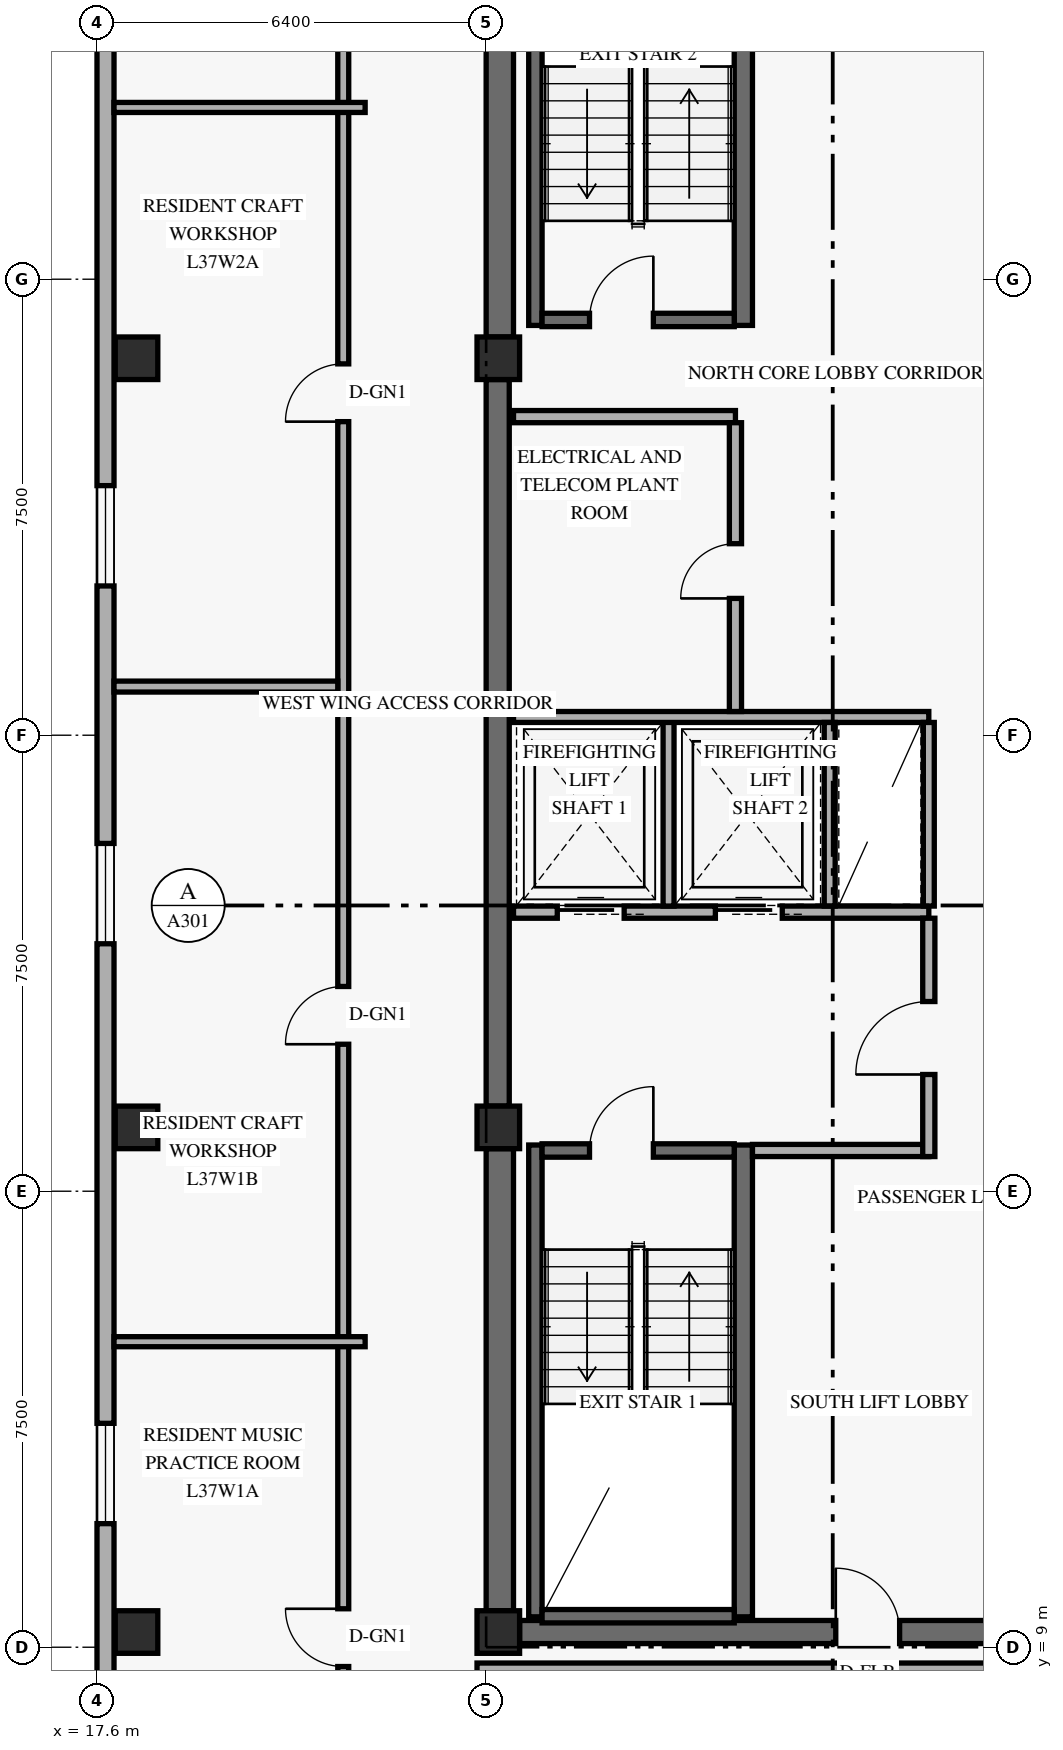
"""IFC4 building model, lengths in metres.
Left out: names, types, materials, properties, quantities, classifications, styles, units other than length and angle.
Written with IfcOpenShell. Run it as: python <this file> out.ifc"""

import sys

from ifc_helpers import new_model, si_unit, direction, frame, frame_2d, origin, origin_2d, place, context, subcontext, project, spatial, rectangle, extrude, element, fill, save


model = new_model("IFC4")
c1 = context("Model", 3, precision=1e-05, world=origin(), true_north=direction((0.0, 1.0)))
c2 = subcontext(c1, "Body", "Model", "MODEL_VIEW")
j1 = project(units=[si_unit("LENGTHUNIT", "METRE"), si_unit("PLANEANGLEUNIT", "RADIAN")], contexts=[c1])
p1 = place(None, origin())
s1 = spatial("IfcSite", under=j1, at=p1, CompositionType="ELEMENT")
p2 = place(p1, origin())
s2 = spatial("IfcBuilding", under=s1, at=p2, CompositionType="ELEMENT")
p3 = place(p2, frame((0.0, 0.0, 144.6)))
s3 = spatial("IfcBuildingStorey", under=s2, at=p3, CompositionType="ELEMENT", Elevation=144.6)
p4 = place(p3, frame((24.225, 9.6, 0.0), z_axis=(0.0, 0.0, 1.0), x_axis=(0.0, 1.0, 0.0)))
e1 = element("IfcWall", 1, at=p4, inside=s3, PredefinedType="SHEAR", context=c2, shape_type="SweptSolid", body=[
    extrude(rectangle(XDim=7.6, YDim=0.45, at=frame_2d((3.8, 0.0))), origin(), (0.0, 0.0, 1.0), 2.748),
])
p5 = place(p3, frame((24.19, 17.9, 0.0), z_axis=(0.0, 0.0, 1.0), x_axis=(0.0, 1.0, 0.0)))
e2 = element("IfcWall", 2, at=p5, inside=s3, PredefinedType="SHEAR", context=c2, shape_type="SweptSolid", body=[
    extrude(rectangle(XDim=11.95, YDim=0.38, at=frame_2d((5.975, 0.0))), origin(), (0.0, 0.0, 1.0), 2.748),
])
p6 = place(p3, frame((24.225, 30.55, 0.0), z_axis=(0.0, 0.0, 1.0), x_axis=(0.0, 1.0, 0.0)))
e3 = element("IfcWall", 3, at=p6, inside=s3, PredefinedType="SHEAR", context=c2, shape_type="SweptSolid", body=[
    extrude(rectangle(XDim=7.85, YDim=0.45, at=frame_2d((3.925, 0.0))), origin(), (0.0, 0.0, 1.0), 2.748),
])
p7 = place(p3, frame((24.55, 9.25, 0.0), z_axis=(0.0, 0.0, 1.0), x_axis=(1.0, 0.0, 0.0)))
e4 = element("IfcWall", 4, at=p7, inside=s3, PredefinedType="SHEAR", context=c2, shape_type="SweptSolid", body=[
    extrude(rectangle(XDim=10.3, YDim=0.38, at=frame_2d((5.15, 0.0))), origin(), (0.0, 0.0, 1.0), 3.36),
])
p8 = place(p7, frame((5.2, 0.0, 0.0)))
e5 = element("IfcOpeningElement", 5, at=p8, cuts=e4, PredefinedType="OPENING", context=c2, shape_type="SweptSolid", body=[
    extrude(rectangle(XDim=1.05, YDim=2.15, at=frame_2d((0.525, 1.075))), frame((0.0, 0.2, 0.0), z_axis=(0.0, -1.0, 0.0), x_axis=(1.0, 0.0, 0.0)), (0.0, 0.0, 1.0), 0.4),
])
p9 = place(p3, frame((24.81, 9.5, 0.0), z_axis=(0.0, 0.0, 1.0), x_axis=(0.0, 1.0, 0.0)))
e6 = element("IfcWall", 6, at=p9, inside=s3, PredefinedType="SHEAR", context=c2, shape_type="SweptSolid", body=[
    extrude(rectangle(XDim=7.76, YDim=0.22, at=frame_2d((3.88, 0.0))), origin(), (0.0, 0.0, 1.0), 3.36),
])
p10 = place(p3, frame((28.23, 9.5, 0.0), z_axis=(0.0, 0.0, 1.0), x_axis=(0.0, 1.0, 0.0)))
e7 = element("IfcWall", 7, at=p10, inside=s3, PredefinedType="SHEAR", context=c2, shape_type="SweptSolid", body=[
    extrude(rectangle(XDim=7.76, YDim=0.3, at=frame_2d((3.88, 0.0))), origin(), (0.0, 0.0, 1.0), 3.36),
])
p11 = place(p3, frame((24.92, 9.51, 0.0), z_axis=(0.0, 0.0, 1.0), x_axis=(1.0, 0.0, 0.0)))
e8 = element("IfcWall", 8, at=p11, inside=s3, PredefinedType="SHEAR", context=c2, shape_type="SweptSolid", body=[
    extrude(rectangle(XDim=3.16, YDim=0.22, at=frame_2d((1.58, 0.0))), origin(), (0.0, 0.0, 1.0), 3.36),
])
p12 = place(p3, frame((24.92, 17.17, 0.0), z_axis=(0.0, 0.0, 1.0), x_axis=(1.0, 0.0, 0.0)))
e9 = element("IfcWall", 9, at=p12, inside=s3, PredefinedType="SHEAR", context=c2, shape_type="SweptSolid", body=[
    extrude(rectangle(XDim=3.16, YDim=0.22, at=frame_2d((1.58, 0.0))), origin(), (0.0, 0.0, 1.0), 3.36),
])
p13 = place(p12, frame((0.78, 0.0, 0.0)))
e10 = element("IfcOpeningElement", 10, at=p13, cuts=e9, PredefinedType="OPENING", context=c2, shape_type="SweptSolid", body=[
    extrude(rectangle(XDim=1.05, YDim=2.15, at=frame_2d((0.525, 1.075))), frame((0.0, 0.12, 0.0), z_axis=(0.0, -1.0, 0.0), x_axis=(1.0, 0.0, 0.0)), (0.0, 0.0, 1.0), 0.24),
])
p14 = place(p3, frame((24.81, 30.74, 0.0), z_axis=(0.0, 0.0, 1.0), x_axis=(0.0, 1.0, 0.0)))
e11 = element("IfcWall", 11, at=p14, inside=s3, PredefinedType="SHEAR", context=c2, shape_type="SweptSolid", body=[
    extrude(rectangle(XDim=7.76, YDim=0.22, at=frame_2d((3.88, 0.0))), origin(), (0.0, 0.0, 1.0), 3.36),
])
p15 = place(p3, frame((28.23, 30.74, 0.0), z_axis=(0.0, 0.0, 1.0), x_axis=(0.0, 1.0, 0.0)))
e12 = element("IfcWall", 12, at=p15, inside=s3, PredefinedType="SHEAR", context=c2, shape_type="SweptSolid", body=[
    extrude(rectangle(XDim=7.76, YDim=0.3, at=frame_2d((3.88, 0.0))), origin(), (0.0, 0.0, 1.0), 3.36),
])
p16 = place(p3, frame((24.92, 30.83, 0.0), z_axis=(0.0, 0.0, 1.0), x_axis=(1.0, 0.0, 0.0)))
e13 = element("IfcWall", 13, at=p16, inside=s3, PredefinedType="SHEAR", context=c2, shape_type="SweptSolid", body=[
    extrude(rectangle(XDim=3.16, YDim=0.22, at=frame_2d((1.58, 0.0))), origin(), (0.0, 0.0, 1.0), 3.36),
])
p17 = place(p16, frame((0.78, 0.0, 0.0)))
e14 = element("IfcOpeningElement", 14, at=p17, cuts=e13, PredefinedType="OPENING", context=c2, shape_type="SweptSolid", body=[
    extrude(rectangle(XDim=1.05, YDim=2.15, at=frame_2d((0.525, 1.075))), frame((0.0, 0.12, 0.0), z_axis=(0.0, -1.0, 0.0), x_axis=(1.0, 0.0, 0.0)), (0.0, 0.0, 1.0), 0.24),
])
for number, where, z_axis, x_axis in (
    (15, (18.25, 9.25, 0.0), (0.0, 0.0, 1.0), (1.0, 0.0, 0.0)),
    (16, (18.25, 17.55, 0.0), (0.0, 0.0, 1.0), (1.0, 0.0, 0.0)),
    (17, (18.25, 30.2, 0.0), (0.0, 0.0, 1.0), (1.0, 0.0, 0.0)),
    (18, (24.2, 9.25, 0.0), (0.0, 0.0, 1.0), (1.0, 0.0, 0.0)),
    (19, (24.2, 17.55, 0.0), (0.0, 0.0, 1.0), (1.0, 0.0, 0.0)),
    (20, (24.2, 30.2, 0.0), (0.0, 0.0, 1.0), (1.0, 0.0, 0.0)),
):
    element("IfcColumn", number, at=place(p3, frame(where, z_axis=z_axis, x_axis=x_axis)), inside=s3, PredefinedType="COLUMN", context=c2, shape_type="SweptSolid", body=[
        extrude(rectangle(XDim=0.7, YDim=0.7, at=origin_2d()), origin(), (0.0, 0.0, 1.0), 3.6),
    ])
p18 = place(p3, frame((17.74, 40.38, 0.0), z_axis=(0.0, 0.0, 1.0), x_axis=(0.0, -1.0, 0.0)))
e21 = element("IfcWall", 21, at=p18, inside=s3, PredefinedType="SOLIDWALL", context=c2, shape_type="SweptSolid", body=[
    extrude(rectangle(XDim=32.76, YDim=0.28, at=frame_2d((16.38, 0.0))), origin(), (0.0, 0.0, 1.0), 3.36),
])
p19 = place(p18, frame((27.698, 0.0, 0.85)))
e22 = element("IfcOpeningElement", 22, at=p19, cuts=e21, PredefinedType="OPENING", context=c2, shape_type="SweptSolid", body=[
    extrude(rectangle(XDim=1.65, YDim=1.6, at=frame_2d((0.825, 0.8))), frame((0.0, 0.15, 0.0), z_axis=(0.0, -1.0, 0.0), x_axis=(1.0, 0.0, 0.0)), (0.0, 0.0, 1.0), 0.3),
])
p20 = place(p18, frame((18.16, 0.0, 0.85)))
e23 = element("IfcOpeningElement", 23, at=p20, cuts=e21, PredefinedType="OPENING", context=c2, shape_type="SweptSolid", body=[
    extrude(rectangle(XDim=1.65, YDim=1.6, at=frame_2d((0.825, 0.8))), frame((0.0, 0.15, 0.0), z_axis=(0.0, -1.0, 0.0), x_axis=(1.0, 0.0, 0.0)), (0.0, 0.0, 1.0), 0.3),
])
p21 = place(p18, frame((12.275, 0.0, 0.85)))
e24 = element("IfcOpeningElement", 24, at=p21, cuts=e21, PredefinedType="OPENING", context=c2, shape_type="SweptSolid", body=[
    extrude(rectangle(XDim=1.65, YDim=1.6, at=frame_2d((0.825, 0.8))), frame((0.0, 0.15, 0.0), z_axis=(0.0, -1.0, 0.0), x_axis=(1.0, 0.0, 0.0)), (0.0, 0.0, 1.0), 0.3),
])
p22 = place(p18, frame((3.238, 0.0, 0.85)))
e25 = element("IfcOpeningElement", 25, at=p22, cuts=e21, PredefinedType="OPENING", context=c2, shape_type="SweptSolid", body=[
    extrude(rectangle(XDim=1.65, YDim=1.6, at=frame_2d((0.825, 0.8))), frame((0.0, 0.15, 0.0), z_axis=(0.0, -1.0, 0.0), x_axis=(1.0, 0.0, 0.0)), (0.0, 0.0, 1.0), 0.3),
])
p23 = place(p3, frame((24.45, 21.09, 0.0), z_axis=(0.0, 0.0, 1.0), x_axis=(1.0, 0.0, 0.0)))
e26 = element("IfcWall", 26, at=p23, inside=s3, PredefinedType="STANDARD", context=c2, shape_type="SweptSolid", body=[
    extrude(rectangle(XDim=6.83, YDim=0.2, at=frame_2d((3.415, 0.0))), origin(), (0.0, 0.0, 1.0), 3.36),
])
p24 = place(p23, frame((0.72, 0.0, 0.0)))
e27 = element("IfcOpeningElement", 27, at=p24, cuts=e26, PredefinedType="OPENING", context=c2, shape_type="SweptSolid", body=[
    extrude(rectangle(XDim=1.1, YDim=2.2, at=frame_2d((0.55, 1.1))), frame((0.0, 0.11, 0.0), z_axis=(0.0, -1.0, 0.0), x_axis=(1.0, 0.0, 0.0)), (0.0, 0.0, 1.0), 0.22),
])
p25 = place(p23, frame((3.32, 0.0, 0.0)))
e28 = element("IfcOpeningElement", 28, at=p25, cuts=e26, PredefinedType="OPENING", context=c2, shape_type="SweptSolid", body=[
    extrude(rectangle(XDim=1.1, YDim=2.2, at=frame_2d((0.55, 1.1))), frame((0.0, 0.11, 0.0), z_axis=(0.0, -1.0, 0.0), x_axis=(1.0, 0.0, 0.0)), (0.0, 0.0, 1.0), 0.22),
])
p26 = place(p3, frame((28.38, 17.17, 0.0), z_axis=(0.0, 0.0, 1.0), x_axis=(1.0, 0.0, 0.0)))
e29 = element("IfcWall", 29, at=p26, inside=s3, PredefinedType="STANDARD", context=c2, shape_type="SweptSolid", body=[
    extrude(rectangle(XDim=2.9, YDim=0.2, at=frame_2d((1.45, 0.0))), origin(), (0.0, 0.0, 1.0), 3.36),
])
p27 = place(p3, frame((31.28, 17.07, 0.0), z_axis=(0.0, 0.0, 1.0), x_axis=(0.0, 1.0, 0.0)))
e30 = element("IfcWall", 30, at=p27, inside=s3, PredefinedType="STANDARD", context=c2, shape_type="SweptSolid", body=[
    extrude(rectangle(XDim=3.92, YDim=0.2, at=frame_2d((1.96, 0.0))), origin(), (0.0, 0.0, 1.0), 2.73),
])
p28 = place(p27, frame((1.35, 0.0, 0.0)))
e31 = element("IfcOpeningElement", 31, at=p28, cuts=e30, PredefinedType="OPENING", context=c2, shape_type="SweptSolid", body=[
    extrude(rectangle(XDim=1.2, YDim=2.15, at=frame_2d((0.6, 1.075))), frame((0.0, 0.11, 0.0), z_axis=(0.0, -1.0, 0.0), x_axis=(1.0, 0.0, 0.0)), (0.0, 0.0, 1.0), 0.22),
])
p29 = place(p3, frame((27.0, 21.19, 0.0), z_axis=(0.0, 0.0, 1.0), x_axis=(0.0, 1.0, 0.0)))
e32 = element("IfcWall", 32, at=p29, inside=s3, PredefinedType="STANDARD", context=c2, shape_type="SweptSolid", body=[
    extrude(rectangle(XDim=3.11, YDim=0.18, at=frame_2d((1.555, 0.0))), origin(), (0.0, 0.0, 1.0), 3.36),
])
p30 = place(p3, frame((24.45, 24.3, 0.0), z_axis=(0.0, 0.0, 1.0), x_axis=(1.0, 0.0, 0.0)))
e33 = element("IfcWall", 33, at=p30, inside=s3, PredefinedType="STANDARD", context=c2, shape_type="SweptSolid", body=[
    extrude(rectangle(XDim=6.83, YDim=0.18, at=frame_2d((3.415, 0.0))), origin(), (0.0, 0.0, 1.0), 3.36),
])
for number, where, z_axis, x_axis in (
    (34, (29.65, 21.19, 0.0), (0.0, 0.0, 1.0), (0.0, 1.0, 0.0)),
    (35, (31.28, 21.19, 0.0), (0.0, 0.0, 1.0), (0.0, 1.0, 0.0)),
):
    element("IfcWall", number, at=place(p3, frame(where, z_axis=z_axis, x_axis=x_axis)), inside=s3, PredefinedType="STANDARD", context=c2, shape_type="SweptSolid", body=[
        extrude(rectangle(XDim=3.02, YDim=0.18, at=frame_2d((1.51, 0.0))), origin(), (0.0, 0.0, 1.0), 3.36),
    ])
p31 = place(p3, frame((24.45, 29.24, 0.0), z_axis=(0.0, 0.0, 1.0), x_axis=(1.0, 0.0, 0.0)))
e36 = element("IfcWall", 36, at=p31, inside=s3, PredefinedType="STANDARD", context=c2, shape_type="SweptSolid", body=[
    extrude(rectangle(XDim=3.65, YDim=0.2, at=frame_2d((1.825, 0.0))), origin(), (0.0, 0.0, 1.0), 3.36),
])
p32 = place(p3, frame((28.1, 24.39, 0.0), z_axis=(0.0, 0.0, 1.0), x_axis=(0.0, 1.0, 0.0)))
e37 = element("IfcWall", 37, at=p32, inside=s3, PredefinedType="STANDARD", context=c2, shape_type="SweptSolid", body=[
    extrude(rectangle(XDim=4.75, YDim=0.2, at=frame_2d((2.375, 0.0))), origin(), (0.0, 0.0, 1.0), 3.36),
])
p33 = place(p32, frame((1.86, 0.0, 0.0)))
e38 = element("IfcOpeningElement", 38, at=p33, cuts=e37, PredefinedType="OPENING", context=c2, shape_type="SweptSolid", body=[
    extrude(rectangle(XDim=0.9, YDim=2.1, at=frame_2d((0.45, 1.05))), frame((0.0, 0.11, 0.0), z_axis=(0.0, -1.0, 0.0), x_axis=(1.0, 0.0, 0.0)), (0.0, 0.0, 1.0), 0.22),
])
p34 = place(p3, frame((21.65, 6.8, 0.0), z_axis=(0.0, 0.0, 1.0), x_axis=(0.0, 1.0, 0.0)))
e39 = element("IfcWall", 39, at=p34, inside=s3, PredefinedType="STANDARD", context=c2, shape_type="SweptSolid", body=[
    extrude(rectangle(XDim=34.4, YDim=0.18, at=frame_2d((17.2, 0.0))), origin(), (0.0, 0.0, 1.0), 2.73),
])
p35 = place(p34, frame((1.883, 0.0, 0.0)))
e40 = element("IfcOpeningElement", 40, at=p35, cuts=e39, PredefinedType="OPENING", context=c2, shape_type="SweptSolid", body=[
    extrude(rectangle(XDim=0.95, YDim=2.15, at=frame_2d((0.475, 1.075))), frame((0.0, 0.1, 0.0), z_axis=(0.0, -1.0, 0.0), x_axis=(1.0, 0.0, 0.0)), (0.0, 0.0, 1.0), 0.2),
])
p36 = place(p34, frame((12.117, 0.0, 0.0)))
e41 = element("IfcOpeningElement", 41, at=p36, cuts=e39, PredefinedType="OPENING", context=c2, shape_type="SweptSolid", body=[
    extrude(rectangle(XDim=0.95, YDim=2.15, at=frame_2d((0.475, 1.075))), frame((0.0, 0.1, 0.0), z_axis=(0.0, -1.0, 0.0), x_axis=(1.0, 0.0, 0.0)), (0.0, 0.0, 1.0), 0.2),
])
p37 = place(p34, frame((22.357, 0.0, 0.0)))
e42 = element("IfcOpeningElement", 42, at=p37, cuts=e39, PredefinedType="OPENING", context=c2, shape_type="SweptSolid", body=[
    extrude(rectangle(XDim=0.95, YDim=2.15, at=frame_2d((0.475, 1.075))), frame((0.0, 0.1, 0.0), z_axis=(0.0, -1.0, 0.0), x_axis=(1.0, 0.0, 0.0)), (0.0, 0.0, 1.0), 0.2),
])
p38 = place(p34, frame((31.792, 0.0, 0.0)))
e43 = element("IfcOpeningElement", 43, at=p38, cuts=e39, PredefinedType="OPENING", context=c2, shape_type="SweptSolid", body=[
    extrude(rectangle(XDim=0.95, YDim=2.15, at=frame_2d((0.475, 1.075))), frame((0.0, 0.1, 0.0), z_axis=(0.0, -1.0, 0.0), x_axis=(1.0, 0.0, 0.0)), (0.0, 0.0, 1.0), 0.2),
])
p39 = place(p3, frame((23.85, 8.65, 0.0), z_axis=(0.0, 0.0, 1.0), x_axis=(1.0, 0.0, 0.0)))
e44 = element("IfcWall", 44, at=p39, inside=s3, PredefinedType="STANDARD", context=c2, shape_type="SweptSolid", body=[
    extrude(rectangle(XDim=11.57, YDim=0.18, at=frame_2d((5.785, 0.0))), origin(), (0.0, 0.0, 1.0), 2.73),
])
p40 = place(p3, frame((17.88, 14.025, 0.0), z_axis=(0.0, 0.0, 1.0), x_axis=(1.0, 0.0, 0.0)))
e45 = element("IfcWall", 45, at=p40, inside=s3, PredefinedType="PARTITIONING", context=c2, shape_type="SweptSolid", body=[
    extrude(rectangle(XDim=4.13, YDim=0.165, at=frame_2d((2.065, 0.0))), origin(), (0.0, 0.0, 1.0), 2.879),
])
p41 = place(p3, frame((17.88, 24.8, 0.0), z_axis=(0.0, 0.0, 1.0), x_axis=(1.0, 0.0, 0.0)))
e46 = element("IfcWall", 46, at=p41, inside=s3, PredefinedType="PARTITIONING", context=c2, shape_type="SweptSolid", body=[
    extrude(rectangle(XDim=3.68, YDim=0.18, at=frame_2d((1.84, 0.0))), origin(), (0.0, 0.0, 1.0), 2.879),
])
p42 = place(p3, frame((17.88, 34.325, 0.0), z_axis=(0.0, 0.0, 1.0), x_axis=(1.0, 0.0, 0.0)))
e47 = element("IfcWall", 47, at=p42, inside=s3, PredefinedType="PARTITIONING", context=c2, shape_type="SweptSolid", body=[
    extrude(rectangle(XDim=4.13, YDim=0.165, at=frame_2d((2.065, 0.0))), origin(), (0.0, 0.0, 1.0), 2.879),
])
p43 = place(p19, origin())
e48 = element("IfcWindow", 48, at=p43, inside=s3, PartitioningType="SINGLE_PANEL", PredefinedType="WINDOW", context=c2, shape_type="SweptSolid", body=[
    extrude(rectangle(XDim=1.65, YDim=1.6, at=frame_2d((0.825, 0.8))), frame((0.0, 0.03, 0.0), z_axis=(0.0, -1.0, 0.0), x_axis=(1.0, 0.0, 0.0)), (0.0, 0.0, 1.0), 0.06),
])
fill(e22, e48)
p44 = place(p20, origin())
e49 = element("IfcWindow", 49, at=p44, inside=s3, PartitioningType="SINGLE_PANEL", PredefinedType="WINDOW", context=c2, shape_type="SweptSolid", body=[
    extrude(rectangle(XDim=1.65, YDim=1.6, at=frame_2d((0.825, 0.8))), frame((0.0, 0.03, 0.0), z_axis=(0.0, -1.0, 0.0), x_axis=(1.0, 0.0, 0.0)), (0.0, 0.0, 1.0), 0.06),
])
fill(e23, e49)
p45 = place(p21, origin())
e50 = element("IfcWindow", 50, at=p45, inside=s3, PartitioningType="SINGLE_PANEL", PredefinedType="WINDOW", context=c2, shape_type="SweptSolid", body=[
    extrude(rectangle(XDim=1.65, YDim=1.6, at=frame_2d((0.825, 0.8))), frame((0.0, 0.03, 0.0), z_axis=(0.0, -1.0, 0.0), x_axis=(1.0, 0.0, 0.0)), (0.0, 0.0, 1.0), 0.06),
])
fill(e24, e50)
p46 = place(p13, frame((1.05, 0.0, 0.0), z_axis=(0.0, 0.0, 1.0), x_axis=(-1.0, 0.0, 0.0)))
e51 = element("IfcDoor", 51, at=p46, inside=s3, OperationType="SINGLE_SWING_LEFT", PredefinedType="DOOR", context=c2, shape_type="SweptSolid", body=[
    extrude(rectangle(XDim=1.05, YDim=2.15, at=frame_2d((0.525, 1.075))), frame((0.0, 0.025, 0.0), z_axis=(0.0, -1.0, 0.0), x_axis=(1.0, 0.0, 0.0)), (0.0, 0.0, 1.0), 0.05),
])
fill(e10, e51)
p47 = place(p17, origin())
e52 = element("IfcDoor", 52, at=p47, inside=s3, OperationType="SINGLE_SWING_RIGHT", PredefinedType="DOOR", context=c2, shape_type="SweptSolid", body=[
    extrude(rectangle(XDim=1.05, YDim=2.15, at=frame_2d((0.525, 1.075))), frame((0.0, 0.025, 0.0), z_axis=(0.0, -1.0, 0.0), x_axis=(1.0, 0.0, 0.0)), (0.0, 0.0, 1.0), 0.05),
])
fill(e14, e52)
p48 = place(p24, origin())
e53 = element("IfcDoor", 53, at=p48, inside=s3, OperationType="SLIDING_TO_LEFT", PredefinedType="DOOR", context=c2, shape_type="SweptSolid", body=[
    extrude(rectangle(XDim=1.1, YDim=2.2, at=frame_2d((0.55, 1.1))), frame((0.0, 0.025, 0.0), z_axis=(0.0, -1.0, 0.0), x_axis=(1.0, 0.0, 0.0)), (0.0, 0.0, 1.0), 0.05),
])
fill(e27, e53)
p49 = place(p25, origin())
e54 = element("IfcDoor", 54, at=p49, inside=s3, OperationType="SLIDING_TO_LEFT", PredefinedType="DOOR", context=c2, shape_type="SweptSolid", body=[
    extrude(rectangle(XDim=1.1, YDim=2.2, at=frame_2d((0.55, 1.1))), frame((0.0, 0.025, 0.0), z_axis=(0.0, -1.0, 0.0), x_axis=(1.0, 0.0, 0.0)), (0.0, 0.0, 1.0), 0.05),
])
fill(e28, e54)
p50 = place(p28, origin())
e55 = element("IfcDoor", 55, at=p50, inside=s3, OperationType="SINGLE_SWING_LEFT", PredefinedType="DOOR", context=c2, shape_type="SweptSolid", body=[
    extrude(rectangle(XDim=1.2, YDim=2.15, at=frame_2d((0.6, 1.075))), frame((0.0, 0.025, 0.0), z_axis=(0.0, -1.0, 0.0), x_axis=(1.0, 0.0, 0.0)), (0.0, 0.0, 1.0), 0.05),
])
fill(e31, e55)
p51 = place(p33, origin())
e56 = element("IfcDoor", 56, at=p51, inside=s3, OperationType="SINGLE_SWING_LEFT", PredefinedType="DOOR", context=c2, shape_type="SweptSolid", body=[
    extrude(rectangle(XDim=0.9, YDim=2.1, at=frame_2d((0.45, 1.05))), frame((0.0, 0.025, 0.0), z_axis=(0.0, -1.0, 0.0), x_axis=(1.0, 0.0, 0.0)), (0.0, 0.0, 1.0), 0.05),
])
fill(e38, e56)
p52 = place(p8, origin())
e57 = element("IfcDoor", 57, at=p52, inside=s3, OperationType="SINGLE_SWING_LEFT", PredefinedType="DOOR", context=c2, shape_type="SweptSolid", body=[
    extrude(rectangle(XDim=1.05, YDim=2.15, at=frame_2d((0.525, 1.075))), frame((0.0, 0.025, 0.0), z_axis=(0.0, -1.0, 0.0), x_axis=(1.0, 0.0, 0.0)), (0.0, 0.0, 1.0), 0.05),
])
fill(e5, e57)
p53 = place(p35, origin())
e58 = element("IfcDoor", 58, at=p53, inside=s3, OperationType="SINGLE_SWING_RIGHT", PredefinedType="DOOR", context=c2, shape_type="SweptSolid", body=[
    extrude(rectangle(XDim=0.95, YDim=2.15, at=frame_2d((0.475, 1.075))), frame((0.0, 0.025, 0.0), z_axis=(0.0, -1.0, 0.0), x_axis=(1.0, 0.0, 0.0)), (0.0, 0.0, 1.0), 0.05),
])
fill(e40, e58)
p54 = place(p36, origin())
e59 = element("IfcDoor", 59, at=p54, inside=s3, OperationType="SINGLE_SWING_LEFT", PredefinedType="DOOR", context=c2, shape_type="SweptSolid", body=[
    extrude(rectangle(XDim=0.95, YDim=2.15, at=frame_2d((0.475, 1.075))), frame((0.0, 0.025, 0.0), z_axis=(0.0, -1.0, 0.0), x_axis=(1.0, 0.0, 0.0)), (0.0, 0.0, 1.0), 0.05),
])
fill(e41, e59)
p55 = place(p37, origin())
e60 = element("IfcDoor", 60, at=p55, inside=s3, OperationType="SINGLE_SWING_LEFT", PredefinedType="DOOR", context=c2, shape_type="SweptSolid", body=[
    extrude(rectangle(XDim=0.95, YDim=2.15, at=frame_2d((0.475, 1.075))), frame((0.0, 0.025, 0.0), z_axis=(0.0, -1.0, 0.0), x_axis=(1.0, 0.0, 0.0)), (0.0, 0.0, 1.0), 0.05),
])
fill(e42, e60)
save(model, sys.argv[1])
